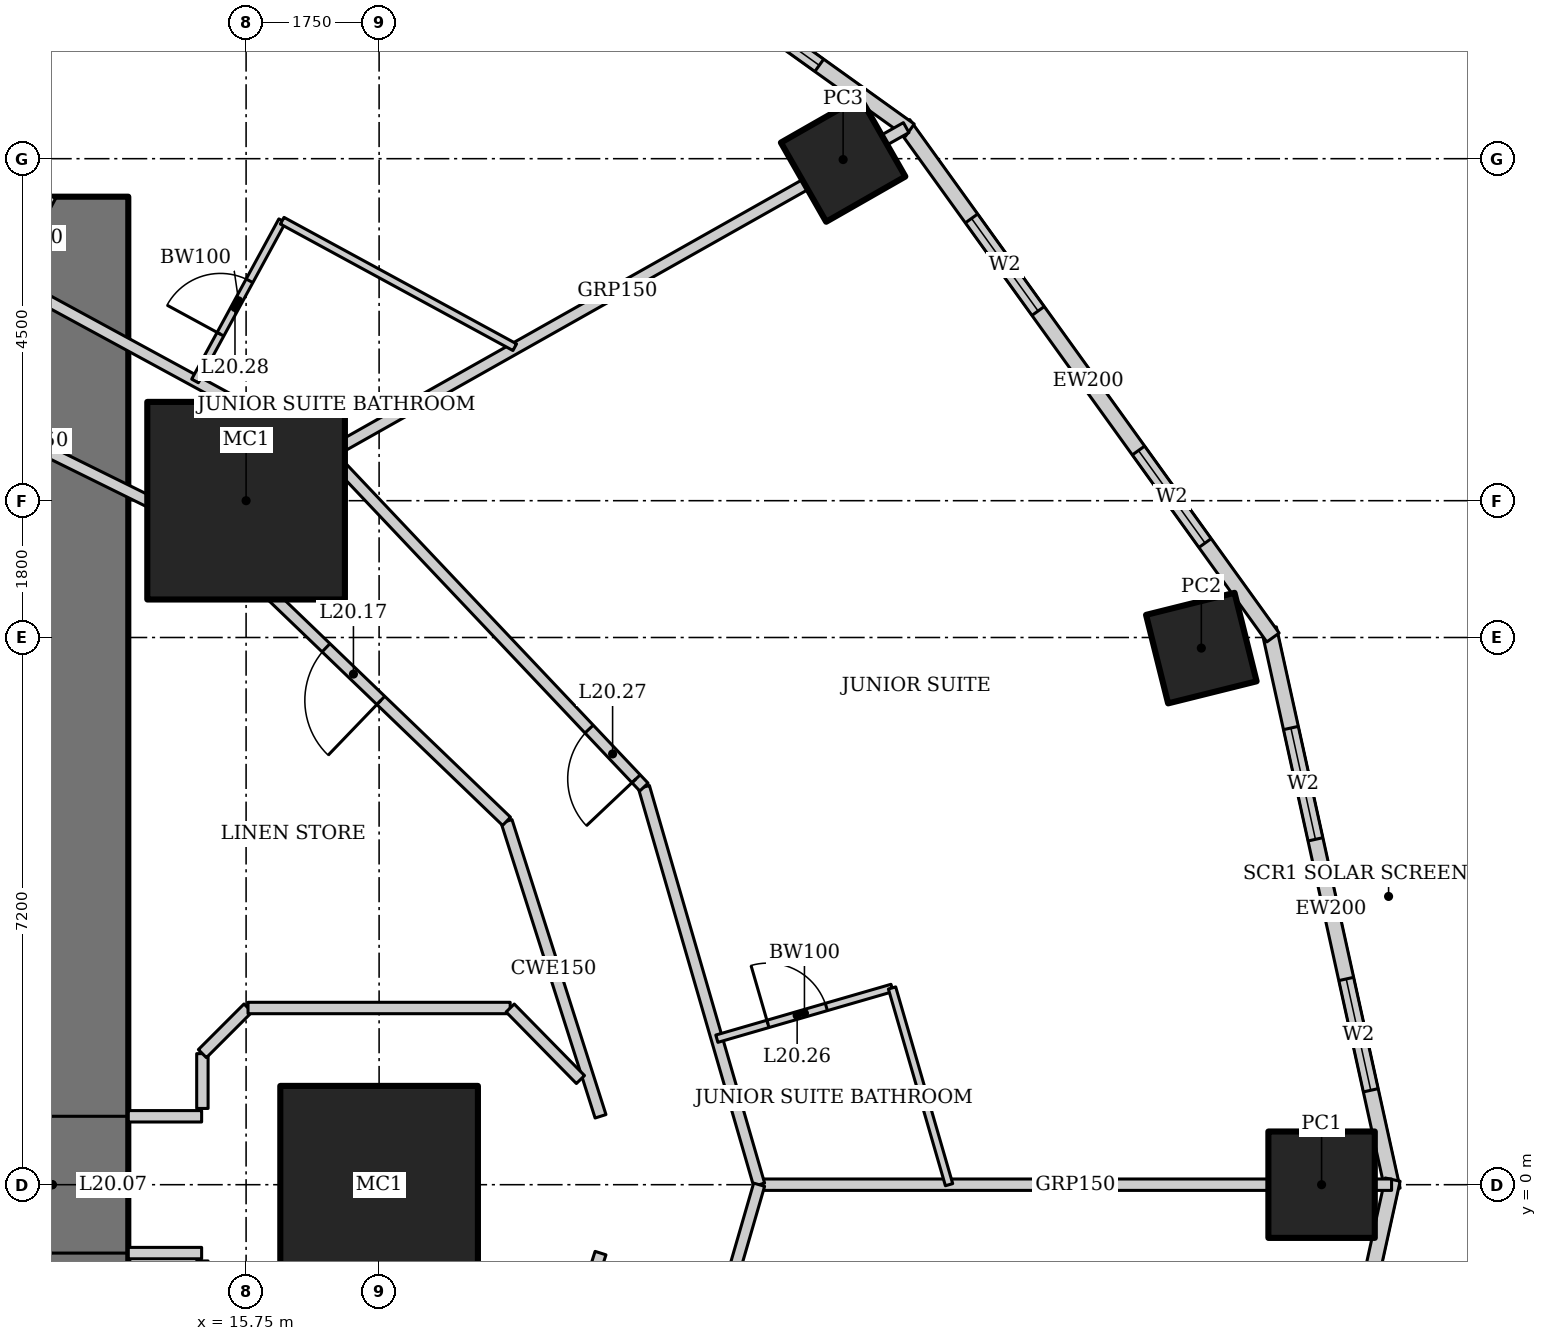
"""IFC4 building model, lengths in metres.
Left out: names, types, materials, properties, quantities, classifications, styles, units other than length and angle.
Written with IfcOpenShell. Run it as: python <this file> out.ifc"""

import sys

from ifc_helpers import new_model, si_unit, direction, frame, frame_2d, origin, origin_2d, place, context, subcontext, project, spatial, rectangle, hollow_rectangle, extrude, element, fill, save


model = new_model("IFC4")
c1 = context("Model", 3, precision=1e-05, world=origin(), true_north=direction((0.0, 1.0)))
c2 = subcontext(c1, "Body", "Model", "MODEL_VIEW")
j1 = project(units=[si_unit("LENGTHUNIT", "METRE"), si_unit("PLANEANGLEUNIT", "RADIAN")], contexts=[c1])
p1 = place(None, origin())
s1 = spatial("IfcSite", under=j1, at=p1, CompositionType="ELEMENT")
p2 = place(p1, origin())
s2 = spatial("IfcBuilding", under=s1, at=p2, CompositionType="ELEMENT")
p3 = place(p2, frame((0.0, 0.0, 87.4)))
s3 = spatial("IfcBuildingStorey", under=s2, at=p3, CompositionType="ELEMENT", Elevation=87.4)
for number, where, z_axis, x_axis in (
    (1, (17.5, 0.0, 0.0), (0.0, 0.0, 1.0), (1.0, 0.0, 0.0)),
    (2, (15.75, 9.0, 0.0), (0.0, 0.0, 1.0), (1.0, 0.0, 0.0)),
):
    element("IfcColumn", number, at=place(p3, frame(where, z_axis=z_axis, x_axis=x_axis)), inside=s3, PredefinedType="COLUMN", context=c2, shape_type="SweptSolid", body=[
        extrude(hollow_rectangle(XDim=2.6, YDim=2.6, WallThickness=0.13, at=origin_2d()), origin(), (0.0, 0.0, 1.0), 3.6),
    ])
p4 = place(p3, frame((29.9, 0.0, 0.0), z_axis=(0.0, 0.0, 1.0), x_axis=(1.0, 0.0, 0.0)))
e3 = element("IfcColumn", 3, at=p4, inside=s3, PredefinedType="COLUMN", context=c2, shape_type="SweptSolid", body=[
    extrude(hollow_rectangle(XDim=1.4, YDim=1.4, WallThickness=0.1, at=origin_2d()), origin(), (0.0, 0.0, 1.0), 3.6),
])
p5 = place(p3, frame((28.318, 7.06, 0.0), z_axis=(0.0, 0.0, 1.0), x_axis=(0.970295726276, 0.2419218956, 0.0)))
e4 = element("IfcColumn", 4, at=p5, inside=s3, PredefinedType="COLUMN", context=c2, shape_type="SweptSolid", body=[
    extrude(hollow_rectangle(XDim=1.2, YDim=1.2, WallThickness=0.1, at=origin_2d()), origin(), (0.0, 0.0, 1.0), 3.6),
])
p6 = place(p3, frame((23.605, 13.489, 0.0), z_axis=(0.0, 0.0, 1.0), x_axis=(0.86824298017, 0.496139221777, 0.0)))
e5 = element("IfcColumn", 5, at=p6, inside=s3, PredefinedType="COLUMN", context=c2, shape_type="SweptSolid", body=[
    extrude(hollow_rectangle(XDim=1.2, YDim=1.2, WallThickness=0.12, at=origin_2d()), origin(), (0.0, 0.0, 1.0), 3.6),
])
p7 = place(p3, frame((13.2, -13.0, 0.0), z_axis=(0.0, 0.0, 1.0), x_axis=(0.0, 1.0, 0.0)))
e6 = element("IfcWall", 6, at=p7, inside=s3, PredefinedType="SHEAR", context=c2, shape_type="SweptSolid", body=[
    extrude(rectangle(XDim=26.0, YDim=2.0, at=frame_2d((13.0, 0.0))), origin(), (0.0, 0.0, 1.0), 3.6),
])
p8 = place(p7, frame((12.1, 0.0, 0.0)))
e7 = element("IfcOpeningElement", 7, at=p8, cuts=e6, PredefinedType="OPENING", context=c2, shape_type="SweptSolid", body=[
    extrude(rectangle(XDim=1.8, YDim=2.1, at=frame_2d((0.9, 1.05))), frame((0.0, 1.01, 0.0), z_axis=(0.0, -1.0, 0.0), x_axis=(1.0, 0.0, 0.0)), (0.0, 0.0, 1.0), 2.02),
])
p9 = place(p3, frame((30.835, -0.067, 0.0), z_axis=(0.0, 0.0, 1.0), x_axis=(-0.215238065514, 0.976561608478, 0.0)))
e8 = element("IfcWall", 8, at=p9, inside=s3, PredefinedType="SOLIDWALL", context=c2, shape_type="SweptSolid", body=[
    extrude(rectangle(XDim=7.562, YDim=0.2, at=frame_2d((3.781, 0.0))), origin(), (0.0, 0.0, 1.0), 3.45),
])
p10 = place(p9, frame((1.341, 0.0, 0.5)))
e9 = element("IfcOpeningElement", 9, at=p10, cuts=e8, PredefinedType="OPENING", context=c2, shape_type="SweptSolid", body=[
    extrude(rectangle(XDim=1.5, YDim=2.2, at=frame_2d((0.75, 1.1))), frame((0.0, 0.11, 0.0), z_axis=(0.0, -1.0, 0.0), x_axis=(1.0, 0.0, 0.0)), (0.0, 0.0, 1.0), 0.22),
])
p11 = place(p9, frame((4.722, 0.0, 0.5)))
e10 = element("IfcOpeningElement", 10, at=p11, cuts=e8, PredefinedType="OPENING", context=c2, shape_type="SweptSolid", body=[
    extrude(rectangle(XDim=1.5, YDim=2.2, at=frame_2d((0.75, 1.1))), frame((0.0, 0.11, 0.0), z_axis=(0.0, -1.0, 0.0), x_axis=(1.0, 0.0, 0.0)), (0.0, 0.0, 1.0), 0.22),
])
p12 = place(p3, frame((29.26, 7.2, 0.0), z_axis=(0.0, 0.0, 1.0), x_axis=(-0.583937613703, 0.811798536155, 0.0)))
e11 = element("IfcWall", 11, at=p12, inside=s3, PredefinedType="SOLIDWALL", context=c2, shape_type="SweptSolid", body=[
    extrude(rectangle(XDim=8.323, YDim=0.2, at=frame_2d((4.162, 0.0))), origin(), (0.0, 0.0, 1.0), 3.45),
])
p13 = place(p12, frame((1.531, 0.0, 0.5)))
e12 = element("IfcOpeningElement", 12, at=p13, cuts=e11, PredefinedType="OPENING", context=c2, shape_type="SweptSolid", body=[
    extrude(rectangle(XDim=1.5, YDim=2.2, at=frame_2d((0.75, 1.1))), frame((0.0, 0.11, 0.0), z_axis=(0.0, -1.0, 0.0), x_axis=(1.0, 0.0, 0.0)), (0.0, 0.0, 1.0), 0.22),
])
p14 = place(p12, frame((5.292, 0.0, 0.5)))
e13 = element("IfcOpeningElement", 13, at=p14, cuts=e11, PredefinedType="OPENING", context=c2, shape_type="SweptSolid", body=[
    extrude(rectangle(XDim=1.5, YDim=2.2, at=frame_2d((0.75, 1.1))), frame((0.0, 0.11, 0.0), z_axis=(0.0, -1.0, 0.0), x_axis=(1.0, 0.0, 0.0)), (0.0, 0.0, 1.0), 0.22),
])
p15 = place(p3, frame((24.482, 13.875, 0.0), z_axis=(0.0, 0.0, 1.0), x_axis=(-0.812791321576, 0.582554948112, 0.0)))
e14 = element("IfcWall", 14, at=p15, inside=s3, PredefinedType="SOLIDWALL", context=c2, shape_type="SweptSolid", body=[
    extrude(rectangle(XDim=8.063, YDim=0.2, at=frame_2d((4.032, 0.0))), origin(), (0.0, 0.0, 1.0), 3.45),
])
p16 = place(p15, frame((1.466, 0.0, 0.5)))
e15 = element("IfcOpeningElement", 15, at=p16, cuts=e14, PredefinedType="OPENING", context=c2, shape_type="SweptSolid", body=[
    extrude(rectangle(XDim=1.5, YDim=2.2, at=frame_2d((0.75, 1.1))), frame((0.0, 0.11, 0.0), z_axis=(0.0, -1.0, 0.0), x_axis=(1.0, 0.0, 0.0)), (0.0, 0.0, 1.0), 0.22),
])
p17 = place(p15, frame((5.097, 0.0, 0.5)))
e16 = element("IfcOpeningElement", 16, at=p17, cuts=e14, PredefinedType="OPENING", context=c2, shape_type="SweptSolid", body=[
    extrude(rectangle(XDim=1.5, YDim=2.2, at=frame_2d((0.75, 1.1))), frame((0.0, 0.11, 0.0), z_axis=(0.0, -1.0, 0.0), x_axis=(1.0, 0.0, 0.0)), (0.0, 0.0, 1.0), 0.22),
])
p18 = place(p3, frame((29.208, -7.318, 0.0), z_axis=(0.0, 0.0, 1.0), x_axis=(0.215238065514, 0.976561608478, 0.0)))
e17 = element("IfcWall", 17, at=p18, inside=s3, PredefinedType="SOLIDWALL", context=c2, shape_type="SweptSolid", body=[
    extrude(rectangle(XDim=7.562, YDim=0.2, at=frame_2d((3.781, 0.0))), origin(), (0.0, 0.0, 1.0), 3.45),
])
p19 = place(p18, frame((1.341, 0.0, 0.5)))
e18 = element("IfcOpeningElement", 18, at=p19, cuts=e17, PredefinedType="OPENING", context=c2, shape_type="SweptSolid", body=[
    extrude(rectangle(XDim=1.5, YDim=2.2, at=frame_2d((0.75, 1.1))), frame((0.0, 0.11, 0.0), z_axis=(0.0, -1.0, 0.0), x_axis=(1.0, 0.0, 0.0)), (0.0, 0.0, 1.0), 0.22),
])
p20 = place(p18, frame((4.722, 0.0, 0.5)))
e19 = element("IfcOpeningElement", 19, at=p20, cuts=e17, PredefinedType="OPENING", context=c2, shape_type="SweptSolid", body=[
    extrude(rectangle(XDim=1.5, YDim=2.2, at=frame_2d((0.75, 1.1))), frame((0.0, 0.11, 0.0), z_axis=(0.0, -1.0, 0.0), x_axis=(1.0, 0.0, 0.0)), (0.0, 0.0, 1.0), 0.22),
])
p21 = place(p3, frame((30.821, 0.0, 0.0), z_axis=(0.0, 0.0, 1.0), x_axis=(-1.0, 0.0, 0.0)))
e20 = element("IfcWall", 20, at=p21, inside=s3, PredefinedType="PARTITIONING", context=c2, shape_type="SweptSolid", body=[
    extrude(rectangle(XDim=8.321, YDim=0.15, at=frame_2d((4.16, 0.0))), origin(), (0.0, 0.0, 1.0), 2.528),
])
p22 = place(p3, frame((24.435, 13.909, 0.0), z_axis=(0.0, 0.0, 1.0), x_axis=(-0.87090601027, -0.491449612143, 0.0)))
e21 = element("IfcWall", 21, at=p22, inside=s3, PredefinedType="PARTITIONING", context=c2, shape_type="SweptSolid", body=[
    extrude(rectangle(XDim=8.726, YDim=0.15, at=frame_2d((4.363, 0.0))), origin(), (0.0, 0.0, 1.0), 2.693),
])
p23 = place(p3, frame((22.5, 0.0, 0.0), z_axis=(0.0, 0.0, 1.0), x_axis=(-0.278247435376, 0.960509429785, 0.0)))
e22 = element("IfcWall", 22, at=p23, inside=s3, PredefinedType="PARTITIONING", context=c2, shape_type="SweptSolid", body=[
    extrude(rectangle(XDim=5.447, YDim=0.15, at=frame_2d((2.724, 0.0))), origin(), (0.0, 0.0, 1.0), 3.45),
])
p24 = place(p3, frame((20.984, 5.232, 0.0), z_axis=(0.0, 0.0, 1.0), x_axis=(-0.687062608696, 0.726598218916, 0.0)))
e23 = element("IfcWall", 23, at=p24, inside=s3, PredefinedType="PARTITIONING", context=c2, shape_type="SweptSolid", body=[
    extrude(rectangle(XDim=6.039, YDim=0.15, at=frame_2d((3.02, 0.0))), origin(), (0.0, 0.0, 1.0), 3.45),
])
p25 = place(p24, frame((0.15, 0.0, 0.0)))
e24 = element("IfcOpeningElement", 24, at=p25, cuts=e23, PredefinedType="OPENING", context=c2, shape_type="SweptSolid", body=[
    extrude(rectangle(XDim=0.9, YDim=2.1, at=frame_2d((0.45, 1.05))), frame((0.0, 0.085, 0.0), z_axis=(0.0, -1.0, 0.0), x_axis=(1.0, 0.0, 0.0)), (0.0, 0.0, 1.0), 0.17),
])
p26 = place(p3, frame((16.835, 9.62, 0.0), z_axis=(0.0, 0.0, 1.0), x_axis=(-0.878450059298, 0.477834169267, 0.0)))
e25 = element("IfcWall", 25, at=p26, inside=s3, PredefinedType="PARTITIONING", context=c2, shape_type="SweptSolid", body=[
    extrude(rectangle(XDim=5.631, YDim=0.15, at=frame_2d((2.815, 0.0))), origin(), (0.0, 0.0, 1.0), 3.45),
])
p27 = place(p3, frame((20.984, -5.232, 0.0), z_axis=(0.0, 0.0, 1.0), x_axis=(0.278247435376, 0.960509429785, 0.0)))
e26 = element("IfcWall", 26, at=p27, inside=s3, PredefinedType="PARTITIONING", context=c2, shape_type="SweptSolid", body=[
    extrude(rectangle(XDim=5.447, YDim=0.15, at=frame_2d((2.724, 0.0))), origin(), (0.0, 0.0, 1.0), 3.45),
])
p28 = place(p27, frame((0.15, 0.0, 0.0)))
e27 = element("IfcOpeningElement", 27, at=p28, cuts=e26, PredefinedType="OPENING", context=c2, shape_type="SweptSolid", body=[
    extrude(rectangle(XDim=0.9, YDim=2.1, at=frame_2d((0.45, 1.05))), frame((0.0, 0.085, 0.0), z_axis=(0.0, -1.0, 0.0), x_axis=(1.0, 0.0, 0.0)), (0.0, 0.0, 1.0), 0.17),
])
p29 = place(p3, frame((20.413, 0.9, 0.0), z_axis=(0.0, 0.0, 1.0), x_axis=(-0.303505448228, 0.952829702988, 0.0)))
e28 = element("IfcWall", 28, at=p29, inside=s3, PredefinedType="PARTITIONING", context=c2, shape_type="SweptSolid", body=[
    extrude(rectangle(XDim=4.073, YDim=0.15, at=frame_2d((2.037, 0.0))), origin(), (0.0, 0.0, 1.0), 3.45),
])
p30 = place(p3, frame((19.177, 4.781, 0.0), z_axis=(0.0, 0.0, 1.0), x_axis=(-0.720837261072, 0.693104352209, 0.0)))
e29 = element("IfcWall", 29, at=p30, inside=s3, PredefinedType="PARTITIONING", context=c2, shape_type="SweptSolid", body=[
    extrude(rectangle(XDim=5.59, YDim=0.15, at=frame_2d((2.795, 0.0))), origin(), (0.0, 0.0, 1.0), 3.45),
])
p31 = place(p30, frame((2.295, 0.0, 0.0)))
e30 = element("IfcOpeningElement", 30, at=p31, cuts=e29, PredefinedType="OPENING", context=c2, shape_type="SweptSolid", body=[
    extrude(rectangle(XDim=1.0, YDim=2.1, at=frame_2d((0.5, 1.05))), frame((0.0, 0.085, 0.0), z_axis=(0.0, -1.0, 0.0), x_axis=(1.0, 0.0, 0.0)), (0.0, 0.0, 1.0), 0.17),
])
p32 = place(p3, frame((15.147, 8.656, 0.0), z_axis=(0.0, 0.0, 1.0), x_axis=(-0.89656943448, 0.442903205177, 0.0)))
e31 = element("IfcWall", 31, at=p32, inside=s3, PredefinedType="PARTITIONING", context=c2, shape_type="SweptSolid", body=[
    extrude(rectangle(XDim=5.126, YDim=0.15, at=frame_2d((2.563, 0.0))), origin(), (0.0, 0.0, 1.0), 3.45),
])
p33 = place(p3, frame((19.177, -4.781, 0.0), z_axis=(0.0, 0.0, 1.0), x_axis=(0.303505448228, 0.952829702988, 0.0)))
e32 = element("IfcWall", 32, at=p33, inside=s3, PredefinedType="PARTITIONING", context=c2, shape_type="SweptSolid", body=[
    extrude(rectangle(XDim=4.073, YDim=0.15, at=frame_2d((2.037, 0.0))), origin(), (0.0, 0.0, 1.0), 3.45),
])
p34 = place(p3, frame((21.943, 1.921, 0.0), z_axis=(0.0, 0.0, 1.0), x_axis=(0.960496317326, 0.278292695563, 0.0)))
e33 = element("IfcWall", 33, at=p34, inside=s3, PredefinedType="PARTITIONING", context=c2, shape_type="SweptSolid", body=[
    extrude(rectangle(XDim=2.4, YDim=0.1, at=frame_2d((1.2, 0.0))), origin(), (0.0, 0.0, 1.0), 3.45),
])
p35 = place(p34, frame((0.7, 0.0, 0.0)))
e34 = element("IfcOpeningElement", 34, at=p35, cuts=e33, PredefinedType="OPENING", context=c2, shape_type="SweptSolid", body=[
    extrude(rectangle(XDim=0.8, YDim=2.1, at=frame_2d((0.4, 1.05))), frame((0.0, 0.06, 0.0), z_axis=(0.0, -1.0, 0.0), x_axis=(1.0, 0.0, 0.0)), (0.0, 0.0, 1.0), 0.12),
])
p36 = place(p3, frame((24.249, 2.589, 0.0), z_axis=(0.0, 0.0, 1.0), x_axis=(0.278260412958, -0.960505670249, 0.0)))
e35 = element("IfcWall", 35, at=p36, inside=s3, PredefinedType="PARTITIONING", context=c2, shape_type="SweptSolid", body=[
    extrude(rectangle(XDim=2.695, YDim=0.1, at=frame_2d((1.348, 0.0))), origin(), (0.0, 0.0, 1.0), 3.45),
])
p37 = place(p3, frame((15.078, 10.576, 0.0), z_axis=(0.0, 0.0, 1.0), x_axis=(0.477832549678, 0.878450940274, 0.0)))
e36 = element("IfcWall", 36, at=p37, inside=s3, PredefinedType="PARTITIONING", context=c2, shape_type="SweptSolid", body=[
    extrude(rectangle(XDim=2.4, YDim=0.1, at=frame_2d((1.2, 0.0))), origin(), (0.0, 0.0, 1.0), 3.45),
])
p38 = place(p37, frame((0.7, 0.0, 0.0)))
e37 = element("IfcOpeningElement", 37, at=p38, cuts=e36, PredefinedType="OPENING", context=c2, shape_type="SweptSolid", body=[
    extrude(rectangle(XDim=0.8, YDim=2.1, at=frame_2d((0.4, 1.05))), frame((0.0, 0.06, 0.0), z_axis=(0.0, -1.0, 0.0), x_axis=(1.0, 0.0, 0.0)), (0.0, 0.0, 1.0), 0.12),
])
p39 = place(p3, frame((16.225, 12.684, 0.0), z_axis=(0.0, 0.0, 1.0), x_axis=(0.878473578893, -0.477790928322, 0.0)))
e38 = element("IfcWall", 38, at=p39, inside=s3, PredefinedType="PARTITIONING", context=c2, shape_type="SweptSolid", body=[
    extrude(rectangle(XDim=3.483, YDim=0.1, at=frame_2d((1.741, 0.0))), origin(), (0.0, 0.0, 1.0), 3.45),
])
p40 = place(p3, frame((13.2, 13.0, 0.0), z_axis=(0.0, 0.0, 1.0), x_axis=(-0.477852414256, -0.878440134665, 0.0)))
e39 = element("IfcWall", 39, at=p40, inside=s3, PredefinedType="PARTITIONING", context=c2, shape_type="SweptSolid", body=[
    extrude(rectangle(XDim=1.232, YDim=0.1, at=frame_2d((0.616, 0.0))), origin(), (0.0, 0.0, 1.0), 3.45),
])
for number, where, z_axis, x_axis in (
    (40, (14.2, -0.9, 0.0), (0.0, 0.0, 1.0), (1.0, 0.0, 0.0)),
    (41, (14.2, 0.9, 0.0), (0.0, 0.0, 1.0), (1.0, 0.0, 0.0)),
):
    element("IfcWall", number, at=place(p3, frame(where, z_axis=z_axis, x_axis=x_axis)), inside=s3, PredefinedType="PARTITIONING", context=c2, shape_type="SweptSolid", body=[
        extrude(rectangle(XDim=0.965, YDim=0.15, at=frame_2d((0.482, 0.0))), origin(), (0.0, 0.0, 1.0), 3.45),
    ])
p41 = place(p3, frame((15.175, 1.003, 0.0), z_axis=(0.0, 0.0, 1.0), x_axis=(0.0, 1.0, 0.0)))
e42 = element("IfcWall", 42, at=p41, inside=s3, PredefinedType="PARTITIONING", context=c2, shape_type="SweptSolid", body=[
    extrude(rectangle(XDim=0.721, YDim=0.15, at=frame_2d((0.361, 0.0))), origin(), (0.0, 0.0, 1.0), 3.45),
])
p42 = place(p3, frame((15.175, 1.725, 0.0), z_axis=(0.0, 0.0, 1.0), x_axis=(0.707106781187, 0.707106781187, 0.0)))
e43 = element("IfcWall", 43, at=p42, inside=s3, PredefinedType="PARTITIONING", context=c2, shape_type="SweptSolid", body=[
    extrude(rectangle(XDim=0.849, YDim=0.15, at=frame_2d((0.425, 0.0))), origin(), (0.0, 0.0, 1.0), 3.45),
])
p43 = place(p3, frame((15.775, 2.325, 0.0), z_axis=(0.0, 0.0, 1.0), x_axis=(1.0, 0.0, 0.0)))
e44 = element("IfcWall", 44, at=p43, inside=s3, PredefinedType="PARTITIONING", context=c2, shape_type="SweptSolid", body=[
    extrude(rectangle(XDim=3.449, YDim=0.15, at=frame_2d((1.725, 0.0))), origin(), (0.0, 0.0, 1.0), 3.45),
])
p44 = place(p3, frame((19.225, 2.325, 0.0), z_axis=(0.0, 0.0, 1.0), x_axis=(0.700694560486, -0.713461374501, 0.0)))
e45 = element("IfcWall", 45, at=p44, inside=s3, PredefinedType="PARTITIONING", context=c2, shape_type="SweptSolid", body=[
    extrude(rectangle(XDim=1.32, YDim=0.15, at=frame_2d((0.66, 0.0))), origin(), (0.0, 0.0, 1.0), 3.45),
])
p45 = place(p10, origin())
e46 = element("IfcWindow", 46, at=p45, inside=s3, PartitioningType="SINGLE_PANEL", PredefinedType="WINDOW", context=c2, shape_type="SweptSolid", body=[
    extrude(rectangle(XDim=1.5, YDim=2.2, at=frame_2d((0.75, 1.1))), frame((0.0, 0.03, 0.0), z_axis=(0.0, -1.0, 0.0), x_axis=(1.0, 0.0, 0.0)), (0.0, 0.0, 1.0), 0.06),
])
fill(e9, e46)
p46 = place(p11, origin())
e47 = element("IfcWindow", 47, at=p46, inside=s3, PartitioningType="SINGLE_PANEL", PredefinedType="WINDOW", context=c2, shape_type="SweptSolid", body=[
    extrude(rectangle(XDim=1.5, YDim=2.2, at=frame_2d((0.75, 1.1))), frame((0.0, 0.03, 0.0), z_axis=(0.0, -1.0, 0.0), x_axis=(1.0, 0.0, 0.0)), (0.0, 0.0, 1.0), 0.06),
])
fill(e10, e47)
p47 = place(p13, origin())
e48 = element("IfcWindow", 48, at=p47, inside=s3, PartitioningType="SINGLE_PANEL", PredefinedType="WINDOW", context=c2, shape_type="SweptSolid", body=[
    extrude(rectangle(XDim=1.5, YDim=2.2, at=frame_2d((0.75, 1.1))), frame((0.0, 0.03, 0.0), z_axis=(0.0, -1.0, 0.0), x_axis=(1.0, 0.0, 0.0)), (0.0, 0.0, 1.0), 0.06),
])
fill(e12, e48)
p48 = place(p14, origin())
e49 = element("IfcWindow", 49, at=p48, inside=s3, PartitioningType="SINGLE_PANEL", PredefinedType="WINDOW", context=c2, shape_type="SweptSolid", body=[
    extrude(rectangle(XDim=1.5, YDim=2.2, at=frame_2d((0.75, 1.1))), frame((0.0, 0.03, 0.0), z_axis=(0.0, -1.0, 0.0), x_axis=(1.0, 0.0, 0.0)), (0.0, 0.0, 1.0), 0.06),
])
fill(e13, e49)
p49 = place(p16, origin())
e50 = element("IfcWindow", 50, at=p49, inside=s3, PartitioningType="SINGLE_PANEL", PredefinedType="WINDOW", context=c2, shape_type="SweptSolid", body=[
    extrude(rectangle(XDim=1.5, YDim=2.2, at=frame_2d((0.75, 1.1))), frame((0.0, 0.03, 0.0), z_axis=(0.0, -1.0, 0.0), x_axis=(1.0, 0.0, 0.0)), (0.0, 0.0, 1.0), 0.06),
])
fill(e15, e50)
p50 = place(p8, origin())
e51 = element("IfcDoor", 51, at=p50, inside=s3, OperationType="DOUBLE_DOOR_DOUBLE_SWING", PredefinedType="DOOR", context=c2, shape_type="SweptSolid", body=[
    extrude(rectangle(XDim=1.8, YDim=2.1, at=frame_2d((0.9, 1.05))), frame((0.0, 0.025, 0.0), z_axis=(0.0, -1.0, 0.0), x_axis=(1.0, 0.0, 0.0)), (0.0, 0.0, 1.0), 0.05),
])
fill(e7, e51)
p51 = place(p31, origin())
e52 = element("IfcDoor", 52, at=p51, inside=s3, OperationType="SINGLE_SWING_LEFT", PredefinedType="DOOR", context=c2, shape_type="SweptSolid", body=[
    extrude(rectangle(XDim=1.0, YDim=2.1, at=frame_2d((0.5, 1.05))), frame((0.0, 0.025, 0.0), z_axis=(0.0, -1.0, 0.0), x_axis=(1.0, 0.0, 0.0)), (0.0, 0.0, 1.0), 0.05),
])
fill(e30, e52)
p52 = place(p35, origin())
e53 = element("IfcDoor", 53, at=p52, inside=s3, OperationType="SINGLE_SWING_LEFT", PredefinedType="DOOR", context=c2, shape_type="SweptSolid", body=[
    extrude(rectangle(XDim=0.8, YDim=2.1, at=frame_2d((0.4, 1.05))), frame((0.0, 0.025, 0.0), z_axis=(0.0, -1.0, 0.0), x_axis=(1.0, 0.0, 0.0)), (0.0, 0.0, 1.0), 0.05),
])
fill(e34, e53)
p53 = place(p25, origin())
e54 = element("IfcDoor", 54, at=p53, inside=s3, OperationType="SINGLE_SWING_LEFT", PredefinedType="DOOR", context=c2, shape_type="SweptSolid", body=[
    extrude(rectangle(XDim=0.9, YDim=2.1, at=frame_2d((0.45, 1.05))), frame((0.0, 0.025, 0.0), z_axis=(0.0, -1.0, 0.0), x_axis=(1.0, 0.0, 0.0)), (0.0, 0.0, 1.0), 0.05),
])
fill(e24, e54)
p54 = place(p38, origin())
e55 = element("IfcDoor", 55, at=p54, inside=s3, OperationType="SINGLE_SWING_LEFT", PredefinedType="DOOR", context=c2, shape_type="SweptSolid", body=[
    extrude(rectangle(XDim=0.8, YDim=2.1, at=frame_2d((0.4, 1.05))), frame((0.0, 0.025, 0.0), z_axis=(0.0, -1.0, 0.0), x_axis=(1.0, 0.0, 0.0)), (0.0, 0.0, 1.0), 0.05),
])
fill(e37, e55)
save(model, sys.argv[1])
